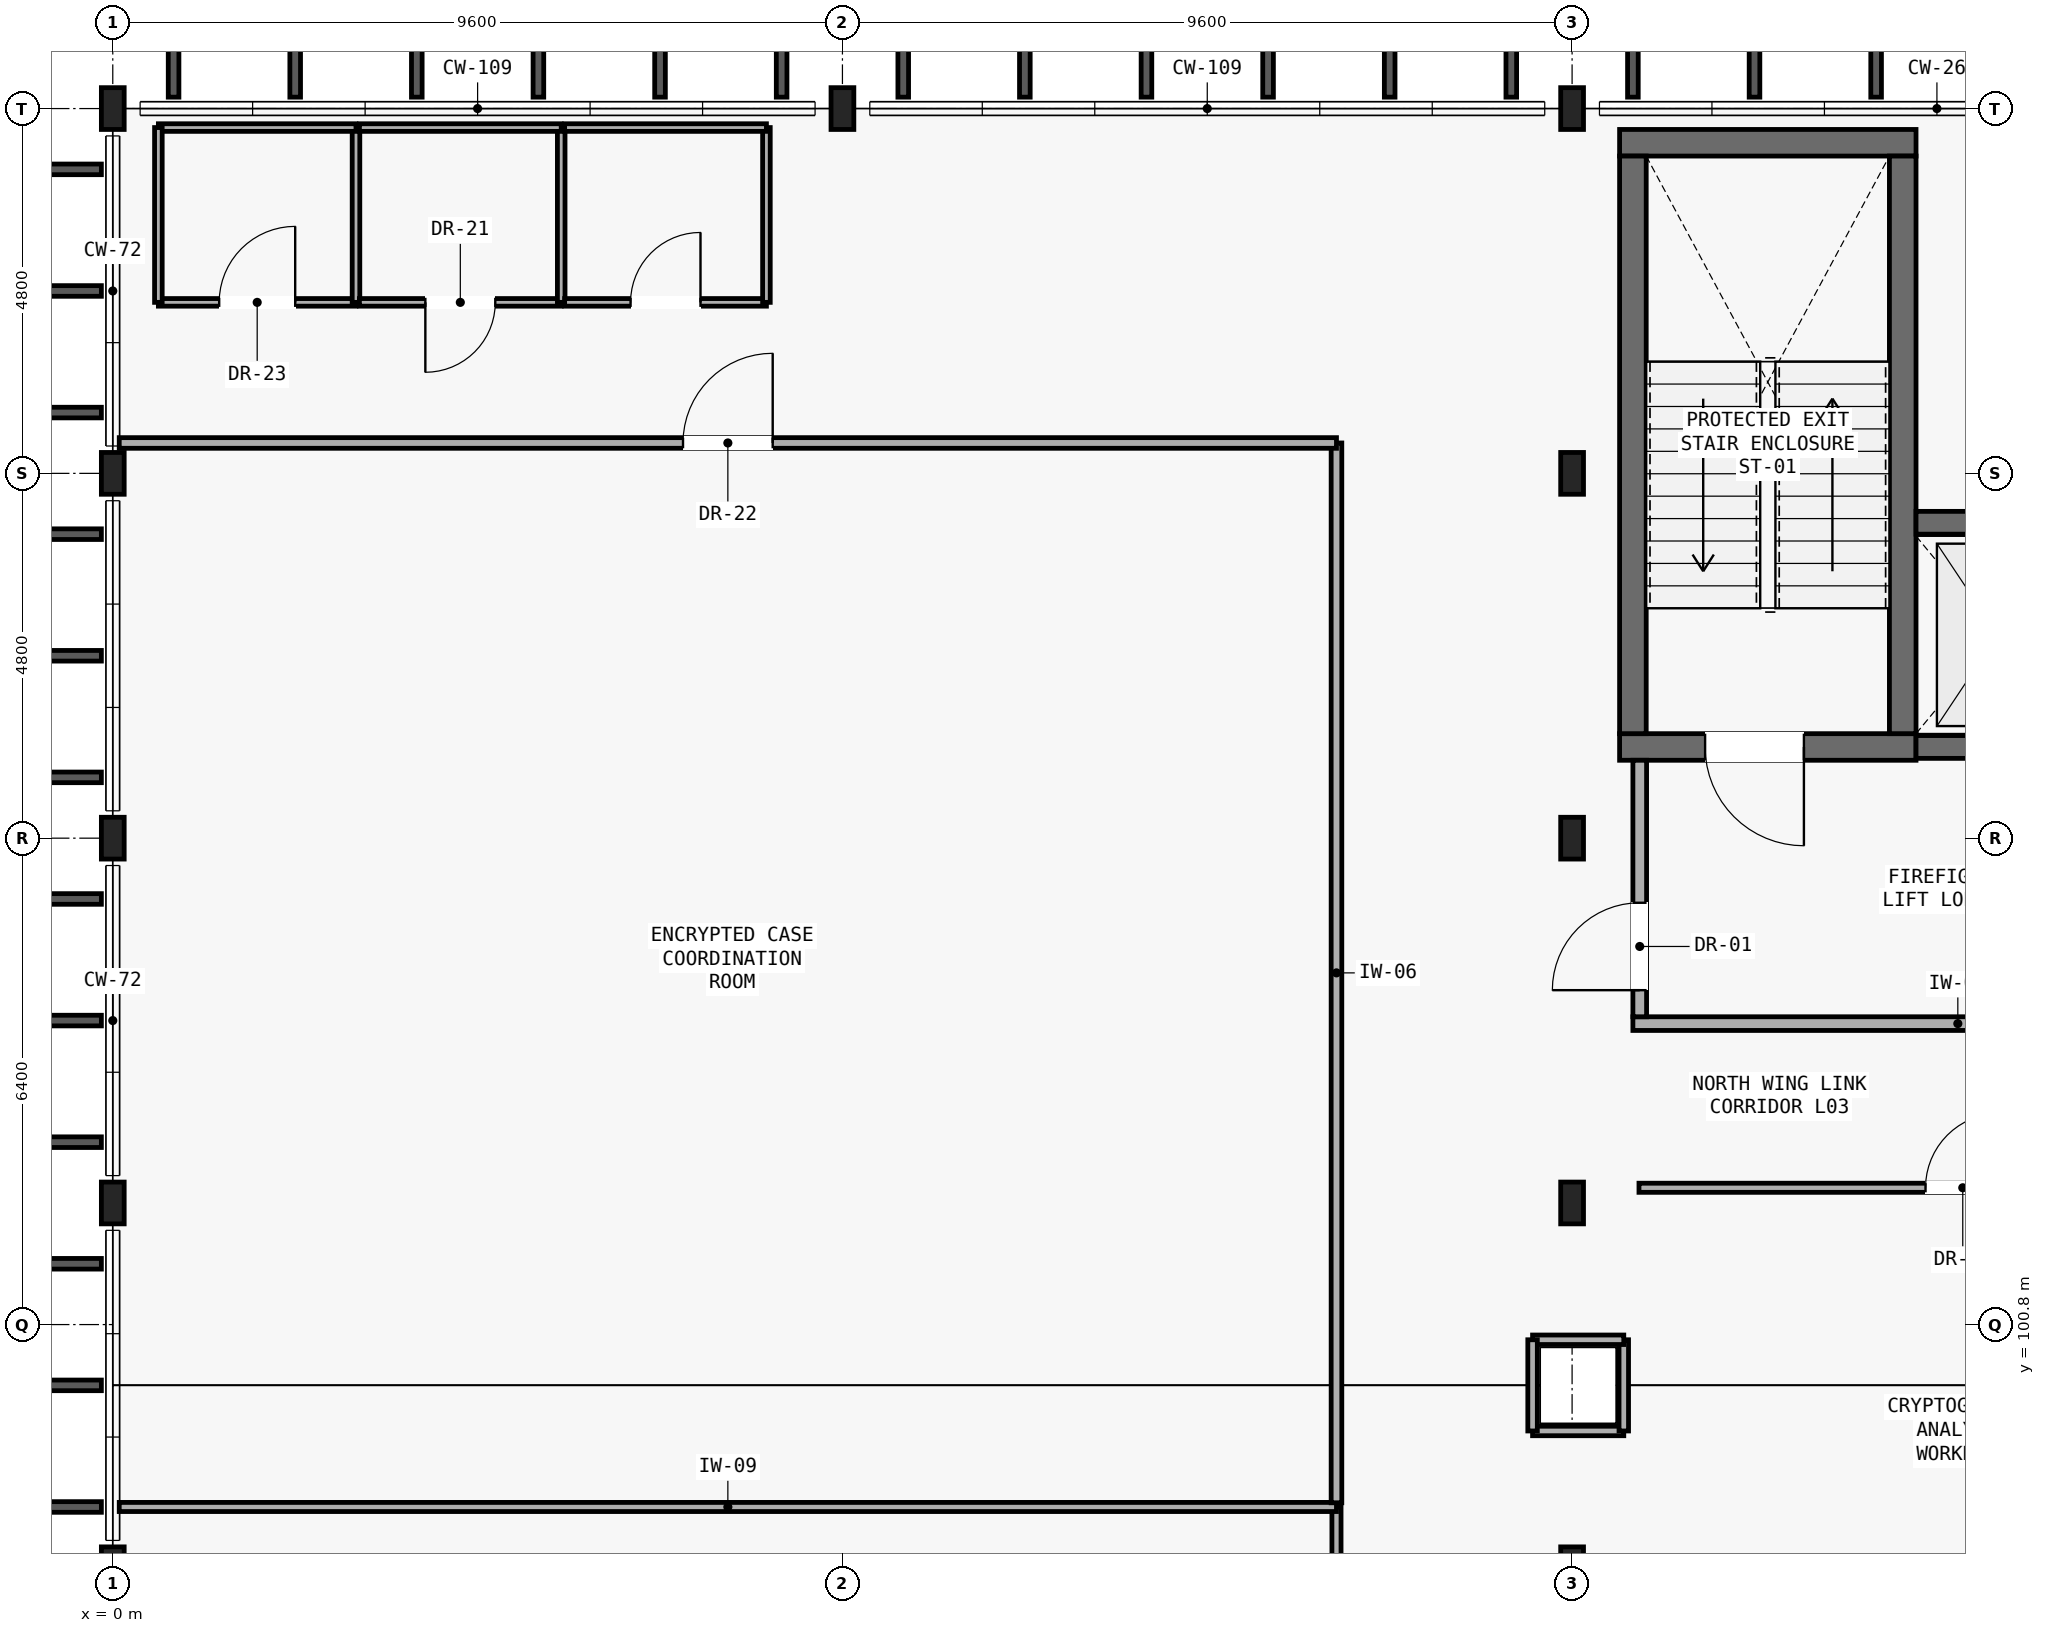
"""IFC4 building model, lengths in metres.
Left out: names, types, materials, properties, quantities, classifications, styles, units other than length and angle.
Written with IfcOpenShell. Run it as: python <this file> out.ifc"""

import sys

from ifc_helpers import new_model, si_unit, direction, frame, frame_2d, origin, origin_2d, place, context, subcontext, project, spatial, rectangle, i_section, extrude, element, fill, save


model = new_model("IFC4")
c1 = context("Model", 3, precision=1e-05, world=origin(), true_north=direction((0.0, 1.0)))
c2 = subcontext(c1, "Body", "Model", "MODEL_VIEW")
j1 = project(units=[si_unit("LENGTHUNIT", "METRE"), si_unit("PLANEANGLEUNIT", "RADIAN")], contexts=[c1])
p1 = place(None, origin())
s1 = spatial("IfcSite", under=j1, at=p1, CompositionType="ELEMENT")
p2 = place(p1, origin())
s2 = spatial("IfcBuilding", under=s1, at=p2, CompositionType="ELEMENT")
p3 = place(p2, frame((0.0, 0.0, 13.65)))
s3 = spatial("IfcBuildingStorey", under=s2, at=p3, CompositionType="ELEMENT", Elevation=13.65)
for number, where, z_axis, x_axis in (
    (1, (0.0, 97.6, 0.0), (0.0, 0.0, 1.0), (1.0, 0.0, 0.0)),
    (2, (0.0, 102.4, 0.0), (0.0, 0.0, 1.0), (1.0, 0.0, 0.0)),
    (3, (0.0, 107.2, 0.0), (0.0, 0.0, 1.0), (1.0, 0.0, 0.0)),
    (4, (0.0, 112.0, 0.0), (0.0, 0.0, 1.0), (1.0, 0.0, 0.0)),
    (5, (0.0, 116.8, 0.0), (0.0, 0.0, 1.0), (1.0, 0.0, 0.0)),
    (6, (9.6, 116.8, 0.0), (0.0, 0.0, 1.0), (1.0, 0.0, 0.0)),
    (7, (19.2, 116.8, 0.0), (0.0, 0.0, 1.0), (1.0, 0.0, 0.0)),
    (8, (19.2, 97.6, 0.0), (0.0, 0.0, 1.0), (1.0, 0.0, 0.0)),
    (9, (19.2, 102.4, 0.0), (0.0, 0.0, 1.0), (1.0, 0.0, 0.0)),
    (10, (19.2, 107.2, 0.0), (0.0, 0.0, 1.0), (1.0, 0.0, 0.0)),
    (11, (19.2, 112.0, 0.0), (0.0, 0.0, 1.0), (1.0, 0.0, 0.0)),
):
    element("IfcColumn", number, at=place(p3, frame(where, z_axis=z_axis, x_axis=x_axis)), inside=s3, PredefinedType="COLUMN", context=c2, shape_type="SweptSolid", body=[
        extrude(i_section(OverallWidth=0.3, OverallDepth=0.55, WebThickness=0.015, FlangeThickness=0.029, FilletRadius=0.027, at=origin_2d()), origin(), (0.0, 0.0, 1.0), 4.2),
    ])
p4 = place(p3, frame((19.825, 108.4, 0.0), z_axis=(0.0, 0.0, 1.0), x_axis=(1.0, 0.0, 0.0)))
e12 = element("IfcWall", 12, at=p4, inside=s3, PredefinedType="SHEAR", context=c2, shape_type="SweptSolid", body=[
    extrude(rectangle(XDim=3.9, YDim=0.35, at=frame_2d((1.95, 0.0))), origin(), (0.0, 0.0, 1.0), 3.98),
])
p5 = place(p4, frame((1.125, 0.0, 0.0)))
e13 = element("IfcOpeningElement", 13, at=p5, cuts=e12, PredefinedType="OPENING", context=c2, shape_type="SweptSolid", body=[
    extrude(rectangle(XDim=1.3, YDim=2.15, at=frame_2d((0.65, 1.075))), frame((0.0, 0.185, 0.0), z_axis=(0.0, -1.0, 0.0), x_axis=(1.0, 0.0, 0.0)), (0.0, 0.0, 1.0), 0.37),
])
p6 = place(p3, frame((19.825, 116.35, 0.0), z_axis=(0.0, 0.0, 1.0), x_axis=(1.0, 0.0, 0.0)))
e14 = element("IfcWall", 14, at=p6, inside=s3, PredefinedType="SHEAR", context=c2, shape_type="SweptSolid", body=[
    extrude(rectangle(XDim=3.9, YDim=0.35, at=frame_2d((1.95, 0.0))), origin(), (0.0, 0.0, 1.0), 3.98),
])
for number, where, z_axis, x_axis in (
    (15, (20.0, 108.575, 0.0), (0.0, 0.0, 1.0), (0.0, 1.0, 0.0)),
    (16, (23.55, 108.575, 0.0), (0.0, 0.0, 1.0), (0.0, 1.0, 0.0)),
):
    element("IfcWall", number, at=place(p3, frame(where, z_axis=z_axis, x_axis=x_axis)), inside=s3, PredefinedType="SHEAR", context=c2, shape_type="SweptSolid", body=[
        extrude(rectangle(XDim=7.6, YDim=0.35, at=frame_2d((3.8, 0.0))), origin(), (0.0, 0.0, 1.0), 3.98),
    ])
p7 = place(p3, frame((23.725, 108.4, 0.0), z_axis=(0.0, 0.0, 1.0), x_axis=(1.0, 0.0, 0.0)))
e17 = element("IfcWall", 17, at=p7, inside=s3, PredefinedType="SHEAR", context=c2, shape_type="SweptSolid", body=[
    extrude(rectangle(XDim=2.5, YDim=0.3, at=frame_2d((1.25, 0.0))), origin(), (0.0, 0.0, 1.0), 3.98),
])
p8 = place(p7, frame((0.7, 0.0, 0.0)))
e18 = element("IfcOpeningElement", 18, at=p8, cuts=e17, PredefinedType="OPENING", context=c2, shape_type="SweptSolid", body=[
    extrude(rectangle(XDim=1.1, YDim=2.1, at=frame_2d((0.55, 1.05))), frame((0.0, 0.16, 0.0), z_axis=(0.0, -1.0, 0.0), x_axis=(1.0, 0.0, 0.0)), (0.0, 0.0, 1.0), 0.32),
])
p9 = place(p3, frame((23.725, 111.35, 0.0), z_axis=(0.0, 0.0, 1.0), x_axis=(1.0, 0.0, 0.0)))
e19 = element("IfcWall", 19, at=p9, inside=s3, PredefinedType="SHEAR", context=c2, shape_type="SweptSolid", body=[
    extrude(rectangle(XDim=2.5, YDim=0.3, at=frame_2d((1.25, 0.0))), origin(), (0.0, 0.0, 1.0), 3.98),
])
p10 = place(p3, frame((20.0, 104.76, 0.0), z_axis=(0.0, 0.0, 1.0), x_axis=(1.0, 0.0, 0.0)))
e20 = element("IfcWall", 20, at=p10, inside=s3, PredefinedType="PARTITIONING", context=c2, shape_type="SweptSolid", body=[
    extrude(rectangle(XDim=8.55, YDim=0.18, at=frame_2d((4.275, 0.0))), origin(), (0.0, 0.0, 1.0), 3.46),
])
p11 = place(p3, frame((20.09, 104.85, 0.0), z_axis=(0.0, 0.0, 1.0), x_axis=(0.0, 1.0, 0.0)))
e21 = element("IfcWall", 21, at=p11, inside=s3, PredefinedType="PARTITIONING", context=c2, shape_type="SweptSolid", body=[
    extrude(rectangle(XDim=3.375, YDim=0.18, at=frame_2d((1.688, 0.0))), origin(), (0.0, 0.0, 1.0), 3.98),
])
p12 = place(p11, frame((0.35, 0.0, 0.0)))
e22 = element("IfcOpeningElement", 22, at=p12, cuts=e21, PredefinedType="OPENING", context=c2, shape_type="SweptSolid", body=[
    extrude(rectangle(XDim=1.15, YDim=2.15, at=frame_2d((0.575, 1.075))), frame((0.0, 0.1, 0.0), z_axis=(0.0, -1.0, 0.0), x_axis=(1.0, 0.0, 0.0)), (0.0, 0.0, 1.0), 0.2),
])
p13 = place(p3, frame((18.68, 99.4, 0.0), z_axis=(0.0, 0.0, 1.0), x_axis=(1.0, 0.0, 0.0)))
e23 = element("IfcWall", 23, at=p13, inside=s3, PredefinedType="PARTITIONING", context=c2, shape_type="SweptSolid", body=[
    extrude(rectangle(XDim=1.2, YDim=0.125, at=frame_2d((0.6, 0.0))), origin(), (0.0, 0.0, 1.0), 3.98),
])
p14 = place(p3, frame((19.88, 99.4, 0.0), z_axis=(0.0, 0.0, 1.0), x_axis=(0.0, 1.0, 0.0)))
e24 = element("IfcWall", 24, at=p14, inside=s3, PredefinedType="PARTITIONING", context=c2, shape_type="SweptSolid", body=[
    extrude(rectangle(XDim=1.2, YDim=0.125, at=frame_2d((0.6, 0.0))), origin(), (0.0, 0.0, 1.0), 3.98),
])
p15 = place(p3, frame((19.88, 100.6, 0.0), z_axis=(0.0, 0.0, 1.0), x_axis=(-1.0, 0.0, 0.0)))
e25 = element("IfcWall", 25, at=p15, inside=s3, PredefinedType="PARTITIONING", context=c2, shape_type="SweptSolid", body=[
    extrude(rectangle(XDim=1.2, YDim=0.125, at=frame_2d((0.6, 0.0))), origin(), (0.0, 0.0, 1.0), 3.98),
])
p16 = place(p3, frame((18.68, 100.6, 0.0), z_axis=(0.0, 0.0, 1.0), x_axis=(0.0, -1.0, 0.0)))
e26 = element("IfcWall", 26, at=p16, inside=s3, PredefinedType="PARTITIONING", context=c2, shape_type="SweptSolid", body=[
    extrude(rectangle(XDim=1.2, YDim=0.125, at=frame_2d((0.6, 0.0))), origin(), (0.0, 0.0, 1.0), 3.98),
])
p17 = place(p3, frame((16.1, 83.4, 0.0), z_axis=(0.0, 0.0, 1.0), x_axis=(0.0, 1.0, 0.0)))
e27 = element("IfcWall", 27, at=p17, inside=s3, PredefinedType="PARTITIONING", context=c2, shape_type="SweptSolid", body=[
    extrude(rectangle(XDim=15.0, YDim=0.12, at=frame_2d((7.5, 0.0))), origin(), (0.0, 0.0, 1.0), 3.98),
])
p18 = place(p17, frame((6.99, 0.0, 0.0)))
e28 = element("IfcOpeningElement", 28, at=p18, cuts=e27, PredefinedType="OPENING", context=c2, shape_type="SweptSolid", body=[
    extrude(rectangle(XDim=1.02, YDim=2.1, at=frame_2d((0.51, 1.05))), frame((0.0, 0.07, 0.0), z_axis=(0.0, -1.0, 0.0), x_axis=(1.0, 0.0, 0.0)), (0.0, 0.0, 1.0), 0.14),
])
p19 = place(p3, frame((16.1, 98.4, 0.0), z_axis=(0.0, 0.0, 1.0), x_axis=(-1.0, 0.0, 0.0)))
e29 = element("IfcWall", 29, at=p19, inside=s3, PredefinedType="PARTITIONING", context=c2, shape_type="SweptSolid", body=[
    extrude(rectangle(XDim=16.015, YDim=0.12, at=frame_2d((8.008, 0.0))), origin(), (0.0, 0.0, 1.0), 3.98),
])
p20 = place(p3, frame((16.1, 98.455, 0.0), z_axis=(0.0, 0.0, 1.0), x_axis=(0.0, 1.0, 0.0)))
e30 = element("IfcWall", 30, at=p20, inside=s3, PredefinedType="PARTITIONING", context=c2, shape_type="SweptSolid", body=[
    extrude(rectangle(XDim=13.945, YDim=0.14, at=frame_2d((6.972, 0.0))), origin(), (0.0, 0.0, 1.0), 3.98),
])
p21 = place(p3, frame((16.1, 112.4, 0.0), z_axis=(0.0, 0.0, 1.0), x_axis=(-1.0, 0.0, 0.0)))
e31 = element("IfcWall", 31, at=p21, inside=s3, PredefinedType="PARTITIONING", context=c2, shape_type="SweptSolid", body=[
    extrude(rectangle(XDim=16.015, YDim=0.14, at=frame_2d((8.008, 0.0))), origin(), (0.0, 0.0, 1.0), 3.98),
])
p22 = place(p21, frame((7.417, 0.0, 0.0)))
e32 = element("IfcOpeningElement", 32, at=p22, cuts=e31, PredefinedType="OPENING", context=c2, shape_type="SweptSolid", body=[
    extrude(rectangle(XDim=1.18, YDim=2.1, at=frame_2d((0.59, 1.05))), frame((0.0, 0.08, 0.0), z_axis=(0.0, -1.0, 0.0), x_axis=(1.0, 0.0, 0.0)), (0.0, 0.0, 1.0), 0.16),
])
p23 = place(p3, frame((0.6, 114.25, 0.0), z_axis=(0.0, 0.0, 1.0), x_axis=(1.0, 0.0, 0.0)))
e33 = element("IfcWall", 33, at=p23, inside=s3, PredefinedType="PARTITIONING", context=c2, shape_type="SweptSolid", body=[
    extrude(rectangle(XDim=2.6, YDim=0.1, at=frame_2d((1.3, 0.0))), origin(), (0.0, 0.0, 1.0), 3.46),
])
p24 = place(p23, frame((0.8, 0.0, 0.0)))
e34 = element("IfcOpeningElement", 34, at=p24, cuts=e33, PredefinedType="OPENING", context=c2, shape_type="SweptSolid", body=[
    extrude(rectangle(XDim=1.0, YDim=2.08, at=frame_2d((0.5, 1.04))), frame((0.0, 0.06, 0.0), z_axis=(0.0, -1.0, 0.0), x_axis=(1.0, 0.0, 0.0)), (0.0, 0.0, 1.0), 0.12),
])
p25 = place(p3, frame((3.2, 114.25, 0.0), z_axis=(0.0, 0.0, 1.0), x_axis=(0.0, 1.0, 0.0)))
e35 = element("IfcWall", 35, at=p25, inside=s3, PredefinedType="PARTITIONING", context=c2, shape_type="SweptSolid", body=[
    extrude(rectangle(XDim=2.3, YDim=0.1, at=frame_2d((1.15, 0.0))), origin(), (0.0, 0.0, 1.0), 3.98),
])
p26 = place(p3, frame((3.2, 116.55, 0.0), z_axis=(0.0, 0.0, 1.0), x_axis=(-1.0, 0.0, 0.0)))
e36 = element("IfcWall", 36, at=p26, inside=s3, PredefinedType="PARTITIONING", context=c2, shape_type="SweptSolid", body=[
    extrude(rectangle(XDim=2.6, YDim=0.1, at=frame_2d((1.3, 0.0))), origin(), (0.0, 0.0, 1.0), 3.16),
])
p27 = place(p3, frame((0.6, 116.55, 0.0), z_axis=(0.0, 0.0, 1.0), x_axis=(0.0, -1.0, 0.0)))
e37 = element("IfcWall", 37, at=p27, inside=s3, PredefinedType="PARTITIONING", context=c2, shape_type="SweptSolid", body=[
    extrude(rectangle(XDim=2.3, YDim=0.1, at=frame_2d((1.15, 0.0))), origin(), (0.0, 0.0, 1.0), 3.98),
])
p28 = place(p3, frame((3.245, 114.25, 0.0), z_axis=(0.0, 0.0, 1.0), x_axis=(1.0, 0.0, 0.0)))
e38 = element("IfcWall", 38, at=p28, inside=s3, PredefinedType="PARTITIONING", context=c2, shape_type="SweptSolid", body=[
    extrude(rectangle(XDim=2.655, YDim=0.1, at=frame_2d((1.327, 0.0))), origin(), (0.0, 0.0, 1.0), 3.46),
])
p29 = place(p28, frame((0.867, 0.0, 0.0)))
e39 = element("IfcOpeningElement", 39, at=p29, cuts=e38, PredefinedType="OPENING", context=c2, shape_type="SweptSolid", body=[
    extrude(rectangle(XDim=0.92, YDim=2.08, at=frame_2d((0.46, 1.04))), frame((0.0, 0.06, 0.0), z_axis=(0.0, -1.0, 0.0), x_axis=(1.0, 0.0, 0.0)), (0.0, 0.0, 1.0), 0.12),
])
p30 = place(p3, frame((5.9, 114.25, 0.0), z_axis=(0.0, 0.0, 1.0), x_axis=(0.0, 1.0, 0.0)))
e40 = element("IfcWall", 40, at=p30, inside=s3, PredefinedType="PARTITIONING", context=c2, shape_type="SweptSolid", body=[
    extrude(rectangle(XDim=2.3, YDim=0.1, at=frame_2d((1.15, 0.0))), origin(), (0.0, 0.0, 1.0), 3.98),
])
p31 = place(p3, frame((5.9, 116.55, 0.0), z_axis=(0.0, 0.0, 1.0), x_axis=(-1.0, 0.0, 0.0)))
e41 = element("IfcWall", 41, at=p31, inside=s3, PredefinedType="PARTITIONING", context=c2, shape_type="SweptSolid", body=[
    extrude(rectangle(XDim=2.655, YDim=0.1, at=frame_2d((1.327, 0.0))), origin(), (0.0, 0.0, 1.0), 3.16),
])
p32 = place(p3, frame((5.945, 114.25, 0.0), z_axis=(0.0, 0.0, 1.0), x_axis=(1.0, 0.0, 0.0)))
e42 = element("IfcWall", 42, at=p32, inside=s3, PredefinedType="PARTITIONING", context=c2, shape_type="SweptSolid", body=[
    extrude(rectangle(XDim=2.655, YDim=0.1, at=frame_2d((1.328, 0.0))), origin(), (0.0, 0.0, 1.0), 3.46),
])
p33 = place(p32, frame((0.867, 0.0, 0.0)))
e43 = element("IfcOpeningElement", 43, at=p33, cuts=e42, PredefinedType="OPENING", context=c2, shape_type="SweptSolid", body=[
    extrude(rectangle(XDim=0.92, YDim=2.08, at=frame_2d((0.46, 1.04))), frame((0.0, 0.06, 0.0), z_axis=(0.0, -1.0, 0.0), x_axis=(1.0, 0.0, 0.0)), (0.0, 0.0, 1.0), 0.12),
])
p34 = place(p3, frame((8.6, 114.25, 0.0), z_axis=(0.0, 0.0, 1.0), x_axis=(0.0, 1.0, 0.0)))
e44 = element("IfcWall", 44, at=p34, inside=s3, PredefinedType="PARTITIONING", context=c2, shape_type="SweptSolid", body=[
    extrude(rectangle(XDim=2.3, YDim=0.1, at=frame_2d((1.15, 0.0))), origin(), (0.0, 0.0, 1.0), 3.98),
])
p35 = place(p3, frame((8.6, 116.55, 0.0), z_axis=(0.0, 0.0, 1.0), x_axis=(-1.0, 0.0, 0.0)))
e45 = element("IfcWall", 45, at=p35, inside=s3, PredefinedType="PARTITIONING", context=c2, shape_type="SweptSolid", body=[
    extrude(rectangle(XDim=2.655, YDim=0.1, at=frame_2d((1.328, 0.0))), origin(), (0.0, 0.0, 1.0), 3.16),
])
p36 = place(p3, frame((28.6, 102.6, 0.0), z_axis=(0.0, 0.0, 1.0), x_axis=(-1.0, 0.0, 0.0)))
e46 = element("IfcWall", 46, at=p36, inside=s3, PredefinedType="PARTITIONING", context=c2, shape_type="SweptSolid", body=[
    extrude(rectangle(XDim=8.52, YDim=0.12, at=frame_2d((4.26, 0.0))), origin(), (0.0, 0.0, 1.0), 3.16),
])
p37 = place(p36, frame((3.77, 0.0, 0.0)))
e47 = element("IfcOpeningElement", 47, at=p37, cuts=e46, PredefinedType="OPENING", context=c2, shape_type="SweptSolid", body=[
    extrude(rectangle(XDim=0.98, YDim=2.1, at=frame_2d((0.49, 1.05))), frame((0.0, 0.07, 0.0), z_axis=(0.0, -1.0, 0.0), x_axis=(1.0, 0.0, 0.0)), (0.0, 0.0, 1.0), 0.14),
])
p38 = place(p5, frame((1.3, 0.0, 0.0), z_axis=(0.0, 0.0, 1.0), x_axis=(-1.0, 0.0, 0.0)))
e48 = element("IfcDoor", 48, at=p38, inside=s3, OperationType="SINGLE_SWING_RIGHT", PredefinedType="DOOR", context=c2, shape_type="SweptSolid", body=[
    extrude(rectangle(XDim=1.3, YDim=2.15, at=frame_2d((0.65, 1.075))), frame((0.0, 0.025, 0.0), z_axis=(0.0, -1.0, 0.0), x_axis=(1.0, 0.0, 0.0)), (0.0, 0.0, 1.0), 0.05),
])
fill(e13, e48)
p39 = place(p12, origin())
e49 = element("IfcDoor", 49, at=p39, inside=s3, OperationType="SINGLE_SWING_LEFT", PredefinedType="DOOR", context=c2, shape_type="SweptSolid", body=[
    extrude(rectangle(XDim=1.15, YDim=2.15, at=frame_2d((0.575, 1.075))), frame((0.0, 0.025, 0.0), z_axis=(0.0, -1.0, 0.0), x_axis=(1.0, 0.0, 0.0)), (0.0, 0.0, 1.0), 0.05),
])
fill(e22, e49)
p40 = place(p22, frame((1.18, 0.0, 0.0), z_axis=(0.0, 0.0, 1.0), x_axis=(-1.0, 0.0, 0.0)))
e50 = element("IfcDoor", 50, at=p40, inside=s3, OperationType="SINGLE_SWING_LEFT", PredefinedType="DOOR", context=c2, shape_type="SweptSolid", body=[
    extrude(rectangle(XDim=1.18, YDim=2.1, at=frame_2d((0.59, 1.05))), frame((0.0, 0.025, 0.0), z_axis=(0.0, -1.0, 0.0), x_axis=(1.0, 0.0, 0.0)), (0.0, 0.0, 1.0), 0.05),
])
fill(e32, e50)
p41 = place(p24, origin())
e51 = element("IfcDoor", 51, at=p41, inside=s3, OperationType="SINGLE_SWING_RIGHT", PredefinedType="DOOR", context=c2, shape_type="SweptSolid", body=[
    extrude(rectangle(XDim=1.0, YDim=2.08, at=frame_2d((0.5, 1.04))), frame((0.0, 0.025, 0.0), z_axis=(0.0, -1.0, 0.0), x_axis=(1.0, 0.0, 0.0)), (0.0, 0.0, 1.0), 0.05),
])
fill(e34, e51)
p42 = place(p29, frame((0.92, 0.0, 0.0), z_axis=(0.0, 0.0, 1.0), x_axis=(-1.0, 0.0, 0.0)))
e52 = element("IfcDoor", 52, at=p42, inside=s3, OperationType="SINGLE_SWING_LEFT", PredefinedType="DOOR", context=c2, shape_type="SweptSolid", body=[
    extrude(rectangle(XDim=0.92, YDim=2.08, at=frame_2d((0.46, 1.04))), frame((0.0, 0.025, 0.0), z_axis=(0.0, -1.0, 0.0), x_axis=(1.0, 0.0, 0.0)), (0.0, 0.0, 1.0), 0.05),
])
fill(e39, e52)
p43 = place(p33, origin())
e53 = element("IfcDoor", 53, at=p43, inside=s3, OperationType="SINGLE_SWING_RIGHT", PredefinedType="DOOR", context=c2, shape_type="SweptSolid", body=[
    extrude(rectangle(XDim=0.92, YDim=2.08, at=frame_2d((0.46, 1.04))), frame((0.0, 0.025, 0.0), z_axis=(0.0, -1.0, 0.0), x_axis=(1.0, 0.0, 0.0)), (0.0, 0.0, 1.0), 0.05),
])
fill(e43, e53)
p44 = place(p37, frame((0.98, 0.0, 0.0), z_axis=(0.0, 0.0, 1.0), x_axis=(-1.0, 0.0, 0.0)))
e54 = element("IfcDoor", 54, at=p44, inside=s3, OperationType="SINGLE_SWING_LEFT", PredefinedType="DOOR", context=c2, shape_type="SweptSolid", body=[
    extrude(rectangle(XDim=0.98, YDim=2.1, at=frame_2d((0.49, 1.05))), frame((0.0, 0.025, 0.0), z_axis=(0.0, -1.0, 0.0), x_axis=(1.0, 0.0, 0.0)), (0.0, 0.0, 1.0), 0.05),
])
fill(e47, e54)
save(model, sys.argv[1])
